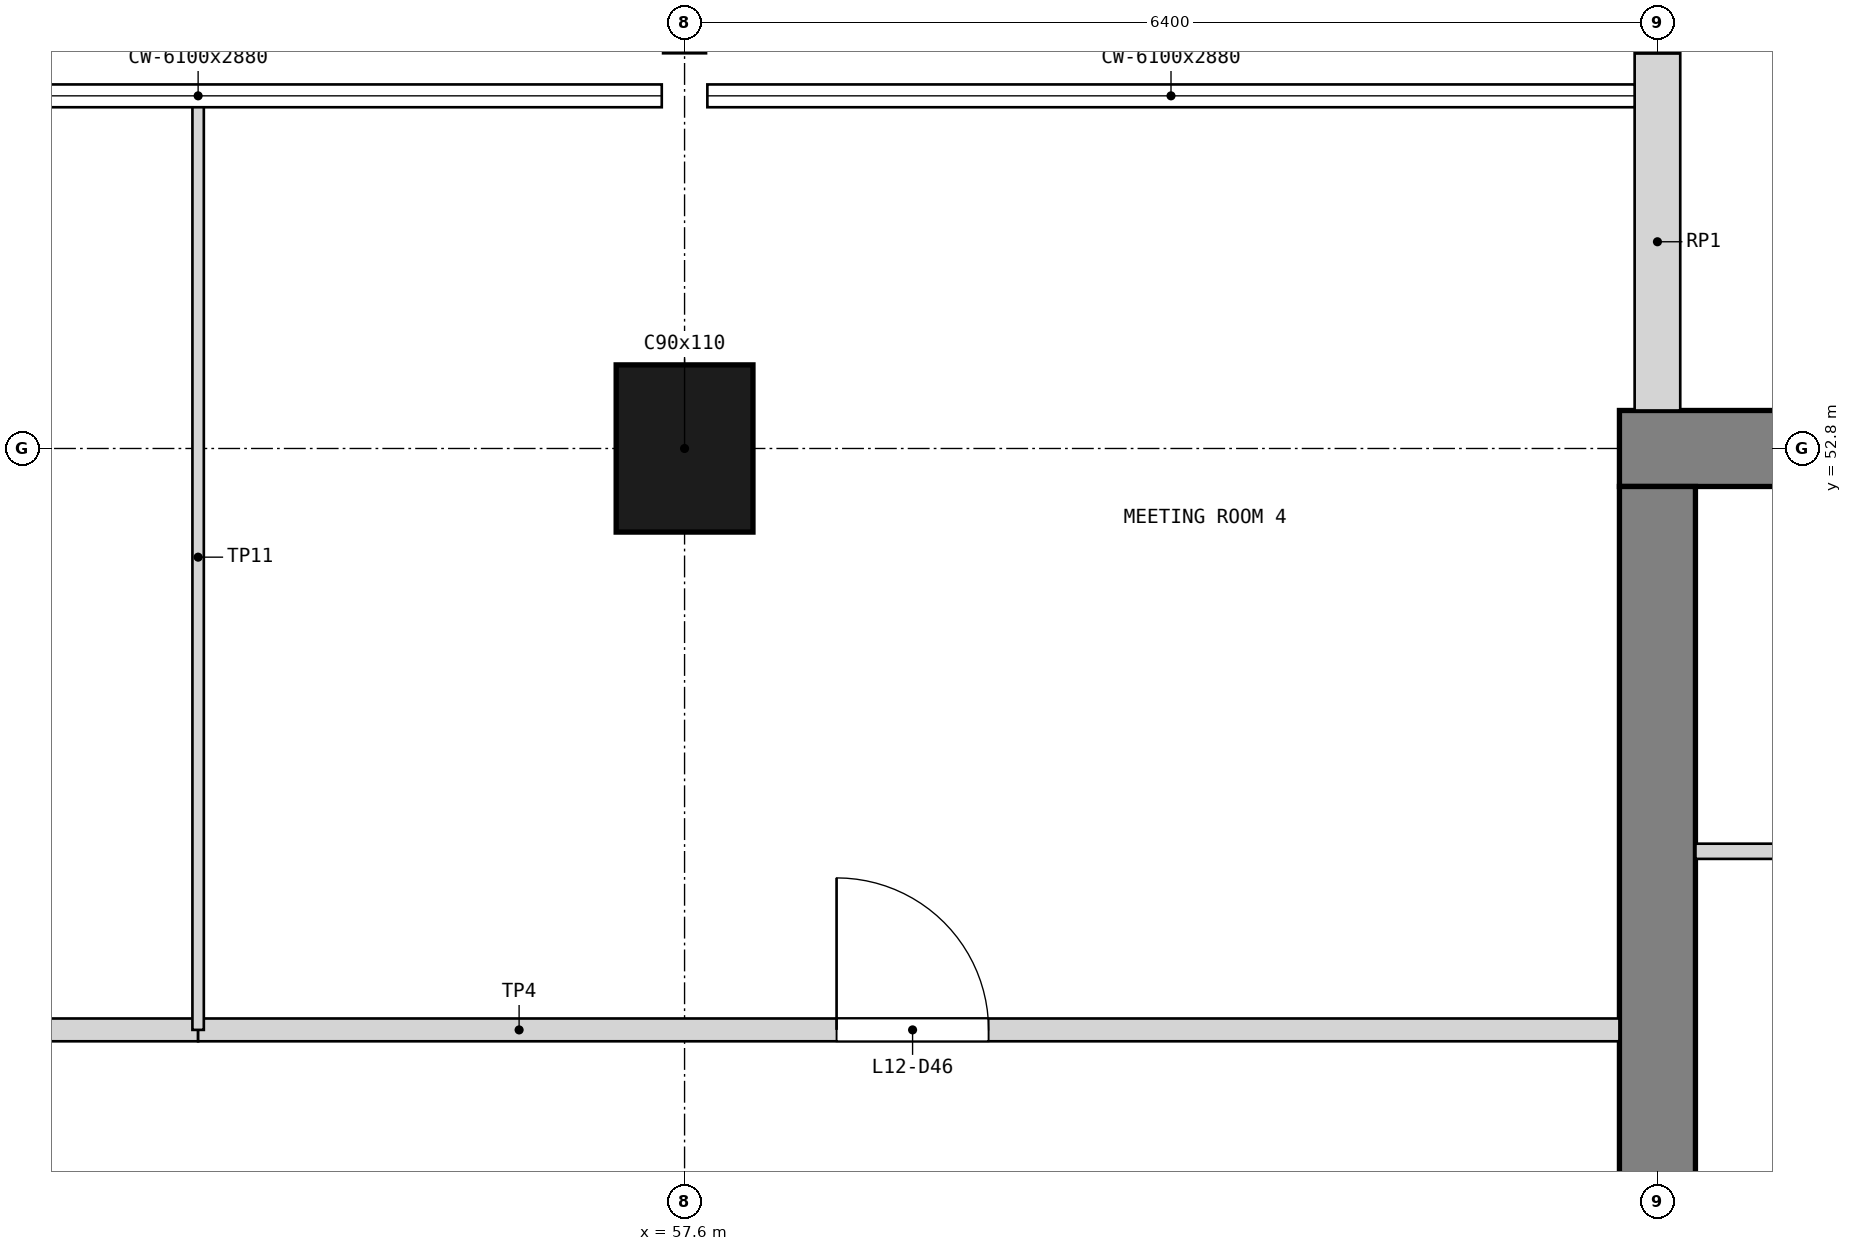
"""IFC4 building model, lengths in metres.
Left out: names, types, materials, properties, quantities, classifications, styles, units other than length and angle.
Written with IfcOpenShell. Run it as: python <this file> out.ifc"""

import sys

from ifc_helpers import new_model, si_unit, direction, frame, frame_2d, origin, origin_2d, place, context, subcontext, project, spatial, rectangle, extrude, element, fill, save


model = new_model("IFC4")
c1 = context("Model", 3, precision=1e-05, world=origin(), true_north=direction((0.0, 1.0)))
c2 = subcontext(c1, "Body", "Model", "MODEL_VIEW")
j1 = project(units=[si_unit("LENGTHUNIT", "METRE"), si_unit("PLANEANGLEUNIT", "RADIAN")], contexts=[c1])
p1 = place(None, origin())
s1 = spatial("IfcSite", under=j1, at=p1, CompositionType="ELEMENT")
p2 = place(p1, origin())
s2 = spatial("IfcBuilding", under=s1, at=p2, CompositionType="ELEMENT")
p3 = place(p2, frame((0.0, 0.0, 48.3)))
s3 = spatial("IfcBuildingStorey", under=s2, at=p3, CompositionType="ELEMENT", Elevation=48.3)
p4 = place(p3, frame((63.75, 52.8, 0.0), z_axis=(0.0, 0.0, 1.0), x_axis=(1.0, 0.0, 0.0)))
e1 = element("IfcWall", 1, at=p4, inside=s3, PredefinedType="SHEAR", context=c2, shape_type="SweptSolid", body=[
    extrude(rectangle(XDim=13.3, YDim=0.5, at=frame_2d((6.65, 0.0))), origin(), (0.0, 0.0, 1.0), 3.9),
])
p5 = place(p4, frame((11.05, 0.0, 1.0)))
e2 = element("IfcOpeningElement", 2, at=p5, cuts=e1, PredefinedType="OPENING", context=c2, shape_type="SweptSolid", body=[
    extrude(rectangle(XDim=0.4, YDim=2.0, at=frame_2d((0.2, 1.0))), frame((0.0, 0.26, 0.0), z_axis=(0.0, -1.0, 0.0), x_axis=(1.0, 0.0, 0.0)), (0.0, 0.0, 1.0), 0.52),
])
p6 = place(p3, frame((64.0, 33.85, 0.0), z_axis=(0.0, 0.0, 1.0), x_axis=(0.0, 1.0, 0.0)))
e3 = element("IfcWall", 3, at=p6, inside=s3, PredefinedType="SHEAR", context=c2, shape_type="SweptSolid", body=[
    extrude(rectangle(XDim=18.7, YDim=0.5, at=frame_2d((9.35, 0.0))), origin(), (0.0, 0.0, 1.0), 3.9),
])
p7 = place(p6, frame((8.35, 0.0, 0.0)))
e4 = element("IfcOpeningElement", 4, at=p7, cuts=e3, PredefinedType="OPENING", context=c2, shape_type="SweptSolid", body=[
    extrude(rectangle(XDim=2.0, YDim=2.1, at=frame_2d((1.0, 1.05))), frame((0.0, 0.26, 0.0), z_axis=(0.0, -1.0, 0.0), x_axis=(1.0, 0.0, 0.0)), (0.0, 0.0, 1.0), 0.52),
])
p8 = place(p3, frame((57.6, 52.8, 0.0), z_axis=(0.0, 0.0, 1.0), x_axis=(1.0, 0.0, 0.0)))
e5 = element("IfcColumn", 5, at=p8, inside=s3, PredefinedType="COLUMN", context=c2, shape_type="SweptSolid", body=[
    extrude(rectangle(XDim=0.9, YDim=1.1, at=origin_2d()), origin(), (0.0, 0.0, 1.0), 3.9),
])
p9 = place(p3, frame((64.0, 53.05, 0.0), z_axis=(0.0, 0.0, 1.0), x_axis=(0.0, 1.0, 0.0)))
e6 = element("IfcWall", 6, at=p9, inside=s3, PredefinedType="SOLIDWALL", context=c2, shape_type="SweptSolid", body=[
    extrude(rectangle(XDim=2.35, YDim=0.3, at=frame_2d((1.175, 0.0))), origin(), (0.0, 0.0, 1.0), 2.88),
])
p10 = place(p3, frame((69.475, 50.15, 0.0), z_axis=(0.0, 0.0, 1.0), x_axis=(-1.0, 0.0, 0.0)))
e7 = element("IfcWall", 7, at=p10, inside=s3, PredefinedType="PARTITIONING", context=c2, shape_type="SweptSolid", body=[
    extrude(rectangle(XDim=5.225, YDim=0.1, at=frame_2d((2.613, 0.0))), origin(), (0.0, 0.0, 1.0), 3.6),
])
p11 = place(p3, frame((44.62, 48.975, 0.0), z_axis=(0.0, 0.0, 1.0), x_axis=(1.0, 0.0, 0.0)))
e8 = element("IfcWall", 8, at=p11, inside=s3, PredefinedType="PARTITIONING", context=c2, shape_type="SweptSolid", body=[
    extrude(rectangle(XDim=9.78, YDim=0.15, at=frame_2d((4.89, 0.0))), origin(), (0.0, 0.0, 1.0), 3.68),
])
p12 = place(p11, frame((3.98, 0.0, 0.0)))
e9 = element("IfcOpeningElement", 9, at=p12, cuts=e8, PredefinedType="OPENING", context=c2, shape_type="SweptSolid", body=[
    extrude(rectangle(XDim=1.8, YDim=2.1, at=frame_2d((0.9, 1.05))), frame((0.0, 0.085, 0.0), z_axis=(0.0, -1.0, 0.0), x_axis=(1.0, 0.0, 0.0)), (0.0, 0.0, 1.0), 0.17),
])
p13 = place(p3, frame((54.4, 48.975, 0.0), z_axis=(0.0, 0.0, 1.0), x_axis=(1.0, 0.0, 0.0)))
e10 = element("IfcWall", 10, at=p13, inside=s3, PredefinedType="PARTITIONING", context=c2, shape_type="SweptSolid", body=[
    extrude(rectangle(XDim=9.35, YDim=0.15, at=frame_2d((4.675, 0.0))), origin(), (0.0, 0.0, 1.0), 3.68),
])
p14 = place(p13, frame((4.2, 0.0, 0.0)))
e11 = element("IfcOpeningElement", 11, at=p14, cuts=e10, PredefinedType="OPENING", context=c2, shape_type="SweptSolid", body=[
    extrude(rectangle(XDim=1.0, YDim=2.1, at=frame_2d((0.5, 1.05))), frame((0.0, 0.085, 0.0), z_axis=(0.0, -1.0, 0.0), x_axis=(1.0, 0.0, 0.0)), (0.0, 0.0, 1.0), 0.17),
])
p15 = place(p3, frame((54.4, 48.975, 0.0), z_axis=(0.0, 0.0, 1.0), x_axis=(0.0, 1.0, 0.0)))
e12 = element("IfcWall", 12, at=p15, inside=s3, PredefinedType="PARTITIONING", context=c2, shape_type="SweptSolid", body=[
    extrude(rectangle(XDim=6.125, YDim=0.075, at=frame_2d((3.062, 0.0))), origin(), (0.0, 0.0, 1.0), 3.08),
])
p16 = place(p14, origin())
e13 = element("IfcDoor", 13, at=p16, inside=s3, OperationType="SINGLE_SWING_LEFT", PredefinedType="DOOR", context=c2, shape_type="SweptSolid", body=[
    extrude(rectangle(XDim=1.0, YDim=2.1, at=frame_2d((0.5, 1.05))), frame((0.0, 0.025, 0.0), z_axis=(0.0, -1.0, 0.0), x_axis=(1.0, 0.0, 0.0)), (0.0, 0.0, 1.0), 0.05),
])
fill(e11, e13)
save(model, sys.argv[1])
